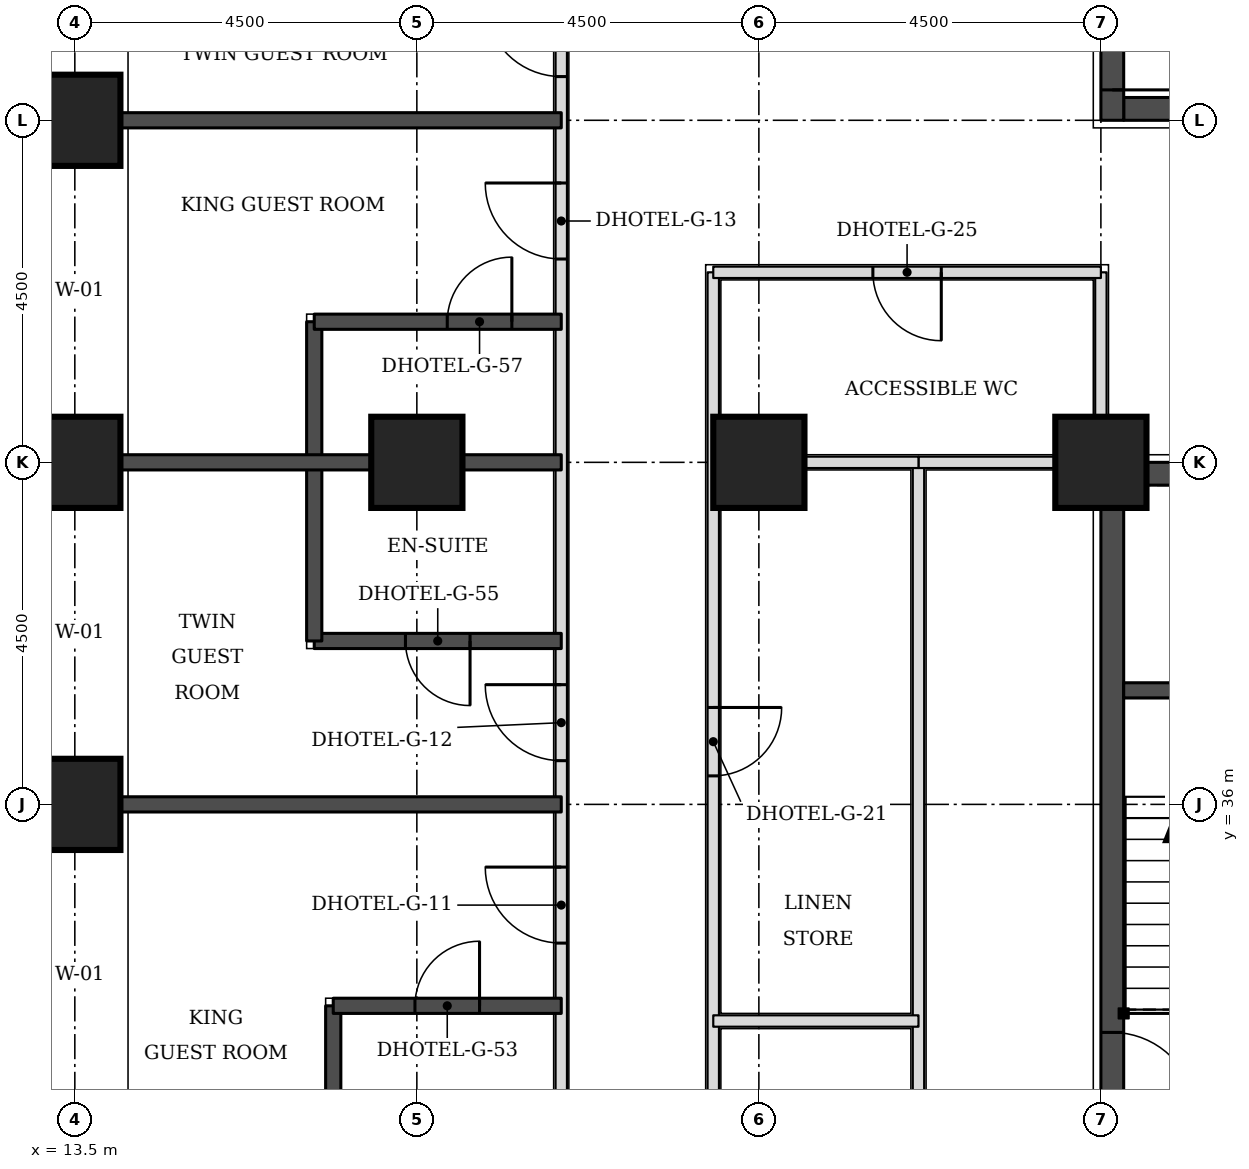
"""IFC4 building model, lengths in metres.
Left out: names, types, materials, properties, quantities, classifications, styles, units other than length and angle.
Written with IfcOpenShell. Run it as: python <this file> out.ifc"""

import sys

from ifc_helpers import new_model, si_unit, direction, frame, frame_2d, origin, origin_2d, place, context, subcontext, project, spatial, rectangle, extrude, element, fill, save


model = new_model("IFC4")
c1 = context("Model", 3, precision=1e-05, world=origin(), true_north=direction((0.0, 1.0)))
c2 = subcontext(c1, "Body", "Model", "MODEL_VIEW")
j1 = project(units=[si_unit("LENGTHUNIT", "METRE"), si_unit("PLANEANGLEUNIT", "RADIAN")], contexts=[c1])
p1 = place(None, origin())
s1 = spatial("IfcSite", under=j1, at=p1, CompositionType="ELEMENT")
p2 = place(p1, origin())
s2 = spatial("IfcBuilding", under=s1, at=p2, CompositionType="ELEMENT")
p3 = place(p2, frame((0.0, 0.0, 66.0)))
s3 = spatial("IfcBuildingStorey", under=s2, at=p3, CompositionType="ELEMENT", Elevation=66.0)
for number, where, z_axis, x_axis in (
    (1, (13.5, 36.0, 0.0), (0.0, 0.0, 1.0), (1.0, 0.0, 0.0)),
    (2, (13.5, 40.5, 0.0), (0.0, 0.0, 1.0), (1.0, 0.0, 0.0)),
    (3, (18.0, 40.5, 0.0), (0.0, 0.0, 1.0), (1.0, 0.0, 0.0)),
    (4, (22.5, 40.5, 0.0), (0.0, 0.0, 1.0), (1.0, 0.0, 0.0)),
    (5, (27.0, 40.5, 0.0), (0.0, 0.0, 1.0), (1.0, 0.0, 0.0)),
    (6, (13.5, 45.0, 0.0), (0.0, 0.0, 1.0), (1.0, 0.0, 0.0)),
):
    element("IfcColumn", number, at=place(p3, frame(where, z_axis=z_axis, x_axis=x_axis)), inside=s3, PredefinedType="COLUMN", context=c2, shape_type="SweptSolid", body=[
        extrude(rectangle(XDim=1.2, YDim=1.2, at=origin_2d()), origin(), (0.0, 0.0, 1.0), 3.3),
    ])
p4 = place(p3, frame((27.3, 45.15, 0.0), z_axis=(0.0, 0.0, 1.0), x_axis=(1.0, 0.0, 0.0)))
e7 = element("IfcWall", 7, at=p4, inside=s3, PredefinedType="SHEAR", context=c2, shape_type="SweptSolid", body=[
    extrude(rectangle(XDim=8.4, YDim=0.3, at=frame_2d((4.2, 0.0))), origin(), (0.0, 0.0, 1.0), 3.3),
])
p5 = place(p4, frame((5.2, 0.0, 0.0)))
e8 = element("IfcOpeningElement", 8, at=p5, cuts=e7, PredefinedType="OPENING", context=c2, shape_type="SweptSolid", body=[
    extrude(rectangle(XDim=1.0, YDim=2.1, at=frame_2d((0.5, 1.05))), frame((0.0, 0.16, 0.0), z_axis=(0.0, -1.0, 0.0), x_axis=(1.0, 0.0, 0.0)), (0.0, 0.0, 1.0), 0.32),
])
p6 = place(p3, frame((27.15, 45.0, 0.0), z_axis=(0.0, 0.0, 1.0), x_axis=(0.0, 1.0, 0.0)))
e9 = element("IfcWall", 9, at=p6, inside=s3, PredefinedType="SHEAR", context=c2, shape_type="SweptSolid", body=[
    extrude(rectangle(XDim=9.0, YDim=0.3, at=frame_2d((4.5, 0.0))), origin(), (0.0, 0.0, 1.0), 3.3),
])
p7 = place(p6, frame((0.4, 0.0, 0.0)))
e10 = element("IfcOpeningElement", 10, at=p7, cuts=e9, PredefinedType="OPENING", context=c2, shape_type="SweptSolid", body=[
    extrude(rectangle(XDim=1.1, YDim=2.1, at=frame_2d((0.55, 1.05))), frame((0.0, 0.16, 0.0), z_axis=(0.0, -1.0, 0.0), x_axis=(1.0, 0.0, 0.0)), (0.0, 0.0, 1.0), 0.32),
])
p8 = place(p3, frame((27.3, 40.35, 0.0), z_axis=(0.0, 0.0, 1.0), x_axis=(1.0, 0.0, 0.0)))
e11 = element("IfcWall", 11, at=p8, inside=s3, PredefinedType="SHEAR", context=c2, shape_type="SweptSolid", body=[
    extrude(rectangle(XDim=8.4, YDim=0.3, at=frame_2d((4.2, 0.0))), origin(), (0.0, 0.0, 1.0), 3.3),
])
p9 = place(p8, frame((6.4, 0.0, 0.0)))
e12 = element("IfcOpeningElement", 12, at=p9, cuts=e11, PredefinedType="OPENING", context=c2, shape_type="SweptSolid", body=[
    extrude(rectangle(XDim=1.1, YDim=2.1, at=frame_2d((0.55, 1.05))), frame((0.0, 0.16, 0.0), z_axis=(0.0, -1.0, 0.0), x_axis=(1.0, 0.0, 0.0)), (0.0, 0.0, 1.0), 0.32),
])
p10 = place(p3, frame((27.15, 31.5, 0.0), z_axis=(0.0, 0.0, 1.0), x_axis=(0.0, 1.0, 0.0)))
e13 = element("IfcWall", 13, at=p10, inside=s3, PredefinedType="SHEAR", context=c2, shape_type="SweptSolid", body=[
    extrude(rectangle(XDim=9.0, YDim=0.3, at=frame_2d((4.5, 0.0))), origin(), (0.0, 0.0, 1.0), 3.3),
])
p11 = place(p10, frame((0.4, 0.0, 0.0)))
e14 = element("IfcOpeningElement", 14, at=p11, cuts=e13, PredefinedType="OPENING", context=c2, shape_type="SweptSolid", body=[
    extrude(rectangle(XDim=1.1, YDim=2.1, at=frame_2d((0.55, 1.05))), frame((0.0, 0.16, 0.0), z_axis=(0.0, -1.0, 0.0), x_axis=(1.0, 0.0, 0.0)), (0.0, 0.0, 1.0), 0.32),
])
p12 = place(p3, frame((19.9, 24.4, 0.0), z_axis=(0.0, 0.0, 1.0), x_axis=(0.0, 1.0, 0.0)))
e15 = element("IfcWall", 15, at=p12, inside=s3, PredefinedType="PARTITIONING", context=c2, shape_type="SweptSolid", body=[
    extrude(rectangle(XDim=25.1, YDim=0.15, at=frame_2d((12.55, 0.0))), origin(), (0.0, 0.0, 1.0), 3.08),
])
p13 = place(p12, frame((0.775, 0.0, 0.0)))
e16 = element("IfcOpeningElement", 16, at=p13, cuts=e15, PredefinedType="OPENING", context=c2, shape_type="SweptSolid", body=[
    extrude(rectangle(XDim=1.0, YDim=2.1, at=frame_2d((0.5, 1.05))), frame((0.0, 0.085, 0.0), z_axis=(0.0, -1.0, 0.0), x_axis=(1.0, 0.0, 0.0)), (0.0, 0.0, 1.0), 0.17),
])
p14 = place(p12, frame((3.175, 0.0, 0.0)))
e17 = element("IfcOpeningElement", 17, at=p14, cuts=e15, PredefinedType="OPENING", context=c2, shape_type="SweptSolid", body=[
    extrude(rectangle(XDim=1.0, YDim=2.1, at=frame_2d((0.5, 1.05))), frame((0.0, 0.085, 0.0), z_axis=(0.0, -1.0, 0.0), x_axis=(1.0, 0.0, 0.0)), (0.0, 0.0, 1.0), 0.17),
])
p15 = place(p12, frame((9.775, 0.0, 0.0)))
e18 = element("IfcOpeningElement", 18, at=p15, cuts=e15, PredefinedType="OPENING", context=c2, shape_type="SweptSolid", body=[
    extrude(rectangle(XDim=1.0, YDim=2.1, at=frame_2d((0.5, 1.05))), frame((0.0, 0.085, 0.0), z_axis=(0.0, -1.0, 0.0), x_axis=(1.0, 0.0, 0.0)), (0.0, 0.0, 1.0), 0.17),
])
p16 = place(p12, frame((12.175, 0.0, 0.0)))
e19 = element("IfcOpeningElement", 19, at=p16, cuts=e15, PredefinedType="OPENING", context=c2, shape_type="SweptSolid", body=[
    extrude(rectangle(XDim=1.0, YDim=2.1, at=frame_2d((0.5, 1.05))), frame((0.0, 0.085, 0.0), z_axis=(0.0, -1.0, 0.0), x_axis=(1.0, 0.0, 0.0)), (0.0, 0.0, 1.0), 0.17),
])
p17 = place(p12, frame((18.775, 0.0, 0.0)))
e20 = element("IfcOpeningElement", 20, at=p17, cuts=e15, PredefinedType="OPENING", context=c2, shape_type="SweptSolid", body=[
    extrude(rectangle(XDim=1.0, YDim=2.1, at=frame_2d((0.5, 1.05))), frame((0.0, 0.085, 0.0), z_axis=(0.0, -1.0, 0.0), x_axis=(1.0, 0.0, 0.0)), (0.0, 0.0, 1.0), 0.17),
])
p18 = place(p12, frame((21.175, 0.0, 0.0)))
e21 = element("IfcOpeningElement", 21, at=p18, cuts=e15, PredefinedType="OPENING", context=c2, shape_type="SweptSolid", body=[
    extrude(rectangle(XDim=1.0, YDim=2.1, at=frame_2d((0.5, 1.05))), frame((0.0, 0.085, 0.0), z_axis=(0.0, -1.0, 0.0), x_axis=(1.0, 0.0, 0.0)), (0.0, 0.0, 1.0), 0.17),
])
p19 = place(p3, frame((21.9, 26.4, 0.0), z_axis=(0.0, 0.0, 1.0), x_axis=(0.0, 1.0, 0.0)))
e22 = element("IfcWall", 22, at=p19, inside=s3, PredefinedType="PARTITIONING", context=c2, shape_type="SweptSolid", body=[
    extrude(rectangle(XDim=16.6, YDim=0.15, at=frame_2d((8.3, 0.0))), origin(), (0.0, 0.0, 1.0), 3.08),
])
p20 = place(p19, frame((2.925, 0.0, 0.0)))
e23 = element("IfcOpeningElement", 23, at=p20, cuts=e22, PredefinedType="OPENING", context=c2, shape_type="SweptSolid", body=[
    extrude(rectangle(XDim=0.9, YDim=2.1, at=frame_2d((0.45, 1.05))), frame((0.0, 0.085, 0.0), z_axis=(0.0, -1.0, 0.0), x_axis=(1.0, 0.0, 0.0)), (0.0, 0.0, 1.0), 0.17),
])
p21 = place(p19, frame((9.975, 0.0, 0.0)))
e24 = element("IfcOpeningElement", 24, at=p21, cuts=e22, PredefinedType="OPENING", context=c2, shape_type="SweptSolid", body=[
    extrude(rectangle(XDim=0.9, YDim=2.1, at=frame_2d((0.45, 1.05))), frame((0.0, 0.085, 0.0), z_axis=(0.0, -1.0, 0.0), x_axis=(1.0, 0.0, 0.0)), (0.0, 0.0, 1.0), 0.17),
])
p22 = place(p3, frame((24.6, 26.4, 0.0), z_axis=(0.0, 0.0, 1.0), x_axis=(0.0, 1.0, 0.0)))
e25 = element("IfcWall", 25, at=p22, inside=s3, PredefinedType="PARTITIONING", context=c2, shape_type="SweptSolid", body=[
    extrude(rectangle(XDim=14.1, YDim=0.15, at=frame_2d((7.05, 0.0))), origin(), (0.0, 0.0, 1.0), 3.08),
])
p23 = place(p3, frame((24.6, 40.5, 0.0), z_axis=(0.0, 0.0, 1.0), x_axis=(1.0, 0.0, 0.0)))
e26 = element("IfcWall", 26, at=p23, inside=s3, PredefinedType="PARTITIONING", context=c2, shape_type="SweptSolid", body=[
    extrude(rectangle(XDim=2.35, YDim=0.15, at=frame_2d((1.175, 0.0))), origin(), (0.0, 0.0, 1.0), 2.33),
])
p24 = place(p3, frame((27.0, 40.55, 0.0), z_axis=(0.0, 0.0, 1.0), x_axis=(0.0, 1.0, 0.0)))
e27 = element("IfcWall", 27, at=p24, inside=s3, PredefinedType="PARTITIONING", context=c2, shape_type="SweptSolid", body=[
    extrude(rectangle(XDim=2.45, YDim=0.15, at=frame_2d((1.225, 0.0))), origin(), (0.0, 0.0, 1.0), 3.08),
])
p25 = place(p3, frame((21.9, 43.0, 0.0), z_axis=(0.0, 0.0, 1.0), x_axis=(1.0, 0.0, 0.0)))
e28 = element("IfcWall", 28, at=p25, inside=s3, PredefinedType="PARTITIONING", context=c2, shape_type="SweptSolid", body=[
    extrude(rectangle(XDim=5.1, YDim=0.15, at=frame_2d((2.55, 0.0))), origin(), (0.0, 0.0, 1.0), 3.08),
])
p26 = place(p25, frame((2.1, 0.0, 0.0)))
e29 = element("IfcOpeningElement", 29, at=p26, cuts=e28, PredefinedType="OPENING", context=c2, shape_type="SweptSolid", body=[
    extrude(rectangle(XDim=0.9, YDim=2.1, at=frame_2d((0.45, 1.05))), frame((0.0, 0.085, 0.0), z_axis=(0.0, -1.0, 0.0), x_axis=(1.0, 0.0, 0.0)), (0.0, 0.0, 1.0), 0.17),
])
p27 = place(p3, frame((16.9, 29.15, 0.0), z_axis=(0.0, 0.0, 1.0), x_axis=(0.0, 1.0, 0.0)))
e30 = element("IfcWall", 30, at=p27, inside=s3, PredefinedType="SOLIDWALL", context=c2, shape_type="SweptSolid", body=[
    extrude(rectangle(XDim=4.2, YDim=0.2, at=frame_2d((2.1, 0.0))), origin(), (0.0, 0.0, 1.0), 3.08),
])
p28 = place(p3, frame((16.9, 33.35, 0.0), z_axis=(0.0, 0.0, 1.0), x_axis=(1.0, 0.0, 0.0)))
e31 = element("IfcWall", 31, at=p28, inside=s3, PredefinedType="SOLIDWALL", context=c2, shape_type="SweptSolid", body=[
    extrude(rectangle(XDim=3.0, YDim=0.2, at=frame_2d((1.5, 0.0))), origin(), (0.0, 0.0, 1.0), 3.08),
])
p29 = place(p28, frame((1.075, 0.0, 0.0)))
e32 = element("IfcOpeningElement", 32, at=p29, cuts=e31, PredefinedType="OPENING", context=c2, shape_type="SweptSolid", body=[
    extrude(rectangle(XDim=0.85, YDim=2.1, at=frame_2d((0.425, 1.05))), frame((0.0, 0.11, 0.0), z_axis=(0.0, -1.0, 0.0), x_axis=(1.0, 0.0, 0.0)), (0.0, 0.0, 1.0), 0.22),
])
p30 = place(p3, frame((14.1, 36.0, 0.0), z_axis=(0.0, 0.0, 1.0), x_axis=(1.0, 0.0, 0.0)))
e33 = element("IfcWall", 33, at=p30, inside=s3, PredefinedType="SOLIDWALL", context=c2, shape_type="SweptSolid", body=[
    extrude(rectangle(XDim=5.8, YDim=0.2, at=frame_2d((2.9, 0.0))), origin(), (0.0, 0.0, 1.0), 3.08),
])
p31 = place(p3, frame((16.65, 38.15, 0.0), z_axis=(0.0, 0.0, 1.0), x_axis=(1.0, 0.0, 0.0)))
e34 = element("IfcWall", 34, at=p31, inside=s3, PredefinedType="SOLIDWALL", context=c2, shape_type="SweptSolid", body=[
    extrude(rectangle(XDim=3.25, YDim=0.2, at=frame_2d((1.625, 0.0))), origin(), (0.0, 0.0, 1.0), 3.08),
])
p32 = place(p31, frame((1.2, 0.0, 0.0)))
e35 = element("IfcOpeningElement", 35, at=p32, cuts=e34, PredefinedType="OPENING", context=c2, shape_type="SweptSolid", body=[
    extrude(rectangle(XDim=0.85, YDim=2.1, at=frame_2d((0.425, 1.05))), frame((0.0, 0.11, 0.0), z_axis=(0.0, -1.0, 0.0), x_axis=(1.0, 0.0, 0.0)), (0.0, 0.0, 1.0), 0.22),
])
p33 = place(p3, frame((16.65, 38.15, 0.0), z_axis=(0.0, 0.0, 1.0), x_axis=(0.0, 1.0, 0.0)))
e36 = element("IfcWall", 36, at=p33, inside=s3, PredefinedType="SOLIDWALL", context=c2, shape_type="SweptSolid", body=[
    extrude(rectangle(XDim=4.2, YDim=0.2, at=frame_2d((2.1, 0.0))), origin(), (0.0, 0.0, 1.0), 3.08),
])
p34 = place(p3, frame((14.1, 40.5, 0.0), z_axis=(0.0, 0.0, 1.0), x_axis=(1.0, 0.0, 0.0)))
e37 = element("IfcWall", 37, at=p34, inside=s3, PredefinedType="SOLIDWALL", context=c2, shape_type="SweptSolid", body=[
    extrude(rectangle(XDim=5.8, YDim=0.2, at=frame_2d((2.9, 0.0))), origin(), (0.0, 0.0, 1.0), 3.08),
])
p35 = place(p3, frame((16.65, 42.35, 0.0), z_axis=(0.0, 0.0, 1.0), x_axis=(1.0, 0.0, 0.0)))
e38 = element("IfcWall", 38, at=p35, inside=s3, PredefinedType="SOLIDWALL", context=c2, shape_type="SweptSolid", body=[
    extrude(rectangle(XDim=3.25, YDim=0.2, at=frame_2d((1.625, 0.0))), origin(), (0.0, 0.0, 1.0), 3.08),
])
p36 = place(p35, frame((1.75, 0.0, 0.0)))
e39 = element("IfcOpeningElement", 39, at=p36, cuts=e38, PredefinedType="OPENING", context=c2, shape_type="SweptSolid", body=[
    extrude(rectangle(XDim=0.85, YDim=2.1, at=frame_2d((0.425, 1.05))), frame((0.0, 0.11, 0.0), z_axis=(0.0, -1.0, 0.0), x_axis=(1.0, 0.0, 0.0)), (0.0, 0.0, 1.0), 0.22),
])
p37 = place(p3, frame((14.1, 45.0, 0.0), z_axis=(0.0, 0.0, 1.0), x_axis=(1.0, 0.0, 0.0)))
e40 = element("IfcWall", 40, at=p37, inside=s3, PredefinedType="SOLIDWALL", context=c2, shape_type="SweptSolid", body=[
    extrude(rectangle(XDim=5.8, YDim=0.2, at=frame_2d((2.9, 0.0))), origin(), (0.0, 0.0, 1.0), 3.08),
])
p38 = place(p3, frame((21.9, 33.15, 0.0), z_axis=(0.0, 0.0, 1.0), x_axis=(1.0, 0.0, 0.0)))
e41 = element("IfcWall", 41, at=p38, inside=s3, PredefinedType="PARTITIONING", context=c2, shape_type="SweptSolid", body=[
    extrude(rectangle(XDim=2.7, YDim=0.15, at=frame_2d((1.35, 0.0))), origin(), (0.0, 0.0, 1.0), 3.08),
])
p39 = place(p3, frame((21.9, 40.5, 0.0), z_axis=(0.0, 0.0, 1.0), x_axis=(1.0, 0.0, 0.0)))
e42 = element("IfcWall", 42, at=p39, inside=s3, PredefinedType="PARTITIONING", context=c2, shape_type="SweptSolid", body=[
    extrude(rectangle(XDim=2.7, YDim=0.15, at=frame_2d((1.35, 0.0))), origin(), (0.0, 0.0, 1.0), 2.33),
])
p40 = place(p3, frame((27.3, 37.5, 0.0), z_axis=(0.0, 0.0, 1.0), x_axis=(1.0, 0.0, 0.0)))
e43 = element("IfcWall", 43, at=p40, inside=s3, PredefinedType="SOLIDWALL", context=c2, shape_type="SweptSolid", body=[
    extrude(rectangle(XDim=5.4, YDim=0.2, at=frame_2d((2.7, 0.0))), origin(), (0.0, 0.0, 1.0), 3.08),
])
p41 = place(p15, origin())
e44 = element("IfcDoor", 44, at=p41, inside=s3, OperationType="SINGLE_SWING_RIGHT", PredefinedType="DOOR", context=c2, shape_type="SweptSolid", body=[
    extrude(rectangle(XDim=1.0, YDim=2.1, at=frame_2d((0.5, 1.05))), frame((0.0, 0.025, 0.0), z_axis=(0.0, -1.0, 0.0), x_axis=(1.0, 0.0, 0.0)), (0.0, 0.0, 1.0), 0.05),
])
fill(e18, e44)
p42 = place(p29, origin())
e45 = element("IfcDoor", 45, at=p42, inside=s3, OperationType="SINGLE_SWING_RIGHT", PredefinedType="DOOR", context=c2, shape_type="SweptSolid", body=[
    extrude(rectangle(XDim=0.85, YDim=2.1, at=frame_2d((0.425, 1.05))), frame((0.0, 0.025, 0.0), z_axis=(0.0, -1.0, 0.0), x_axis=(1.0, 0.0, 0.0)), (0.0, 0.0, 1.0), 0.05),
])
fill(e32, e45)
p43 = place(p16, origin())
e46 = element("IfcDoor", 46, at=p43, inside=s3, OperationType="SINGLE_SWING_RIGHT", PredefinedType="DOOR", context=c2, shape_type="SweptSolid", body=[
    extrude(rectangle(XDim=1.0, YDim=2.1, at=frame_2d((0.5, 1.05))), frame((0.0, 0.025, 0.0), z_axis=(0.0, -1.0, 0.0), x_axis=(1.0, 0.0, 0.0)), (0.0, 0.0, 1.0), 0.05),
])
fill(e19, e46)
p44 = place(p32, frame((0.85, 0.0, 0.0), z_axis=(0.0, 0.0, 1.0), x_axis=(-1.0, 0.0, 0.0)))
e47 = element("IfcDoor", 47, at=p44, inside=s3, OperationType="SINGLE_SWING_LEFT", PredefinedType="DOOR", context=c2, shape_type="SweptSolid", body=[
    extrude(rectangle(XDim=0.85, YDim=2.1, at=frame_2d((0.425, 1.05))), frame((0.0, 0.025, 0.0), z_axis=(0.0, -1.0, 0.0), x_axis=(1.0, 0.0, 0.0)), (0.0, 0.0, 1.0), 0.05),
])
fill(e35, e47)
p45 = place(p17, origin())
e48 = element("IfcDoor", 48, at=p45, inside=s3, OperationType="SINGLE_SWING_RIGHT", PredefinedType="DOOR", context=c2, shape_type="SweptSolid", body=[
    extrude(rectangle(XDim=1.0, YDim=2.1, at=frame_2d((0.5, 1.05))), frame((0.0, 0.025, 0.0), z_axis=(0.0, -1.0, 0.0), x_axis=(1.0, 0.0, 0.0)), (0.0, 0.0, 1.0), 0.05),
])
fill(e20, e48)
p46 = place(p36, origin())
e49 = element("IfcDoor", 49, at=p46, inside=s3, OperationType="SINGLE_SWING_RIGHT", PredefinedType="DOOR", context=c2, shape_type="SweptSolid", body=[
    extrude(rectangle(XDim=0.85, YDim=2.1, at=frame_2d((0.425, 1.05))), frame((0.0, 0.025, 0.0), z_axis=(0.0, -1.0, 0.0), x_axis=(1.0, 0.0, 0.0)), (0.0, 0.0, 1.0), 0.05),
])
fill(e39, e49)
p47 = place(p18, origin())
e50 = element("IfcDoor", 50, at=p47, inside=s3, OperationType="SINGLE_SWING_RIGHT", PredefinedType="DOOR", context=c2, shape_type="SweptSolid", body=[
    extrude(rectangle(XDim=1.0, YDim=2.1, at=frame_2d((0.5, 1.05))), frame((0.0, 0.025, 0.0), z_axis=(0.0, -1.0, 0.0), x_axis=(1.0, 0.0, 0.0)), (0.0, 0.0, 1.0), 0.05),
])
fill(e21, e50)
p48 = place(p21, frame((0.9, 0.0, 0.0), z_axis=(0.0, 0.0, 1.0), x_axis=(-1.0, 0.0, 0.0)))
e51 = element("IfcDoor", 51, at=p48, inside=s3, OperationType="SINGLE_SWING_LEFT", PredefinedType="DOOR", context=c2, shape_type="SweptSolid", body=[
    extrude(rectangle(XDim=0.9, YDim=2.1, at=frame_2d((0.45, 1.05))), frame((0.0, 0.025, 0.0), z_axis=(0.0, -1.0, 0.0), x_axis=(1.0, 0.0, 0.0)), (0.0, 0.0, 1.0), 0.05),
])
fill(e24, e51)
p49 = place(p26, frame((0.9, 0.0, 0.0), z_axis=(0.0, 0.0, 1.0), x_axis=(-1.0, 0.0, 0.0)))
e52 = element("IfcDoor", 52, at=p49, inside=s3, OperationType="SINGLE_SWING_LEFT", PredefinedType="DOOR", context=c2, shape_type="SweptSolid", body=[
    extrude(rectangle(XDim=0.9, YDim=2.1, at=frame_2d((0.45, 1.05))), frame((0.0, 0.025, 0.0), z_axis=(0.0, -1.0, 0.0), x_axis=(1.0, 0.0, 0.0)), (0.0, 0.0, 1.0), 0.05),
])
fill(e29, e52)
p50 = place(p7, frame((1.1, 0.0, 0.0), z_axis=(0.0, 0.0, 1.0), x_axis=(-1.0, 0.0, 0.0)))
e53 = element("IfcDoor", 53, at=p50, inside=s3, OperationType="SINGLE_SWING_RIGHT", PredefinedType="DOOR", context=c2, shape_type="SweptSolid", body=[
    extrude(rectangle(XDim=1.1, YDim=2.1, at=frame_2d((0.55, 1.05))), frame((0.0, 0.025, 0.0), z_axis=(0.0, -1.0, 0.0), x_axis=(1.0, 0.0, 0.0)), (0.0, 0.0, 1.0), 0.05),
])
fill(e10, e53)
p51 = place(p11, frame((1.1, 0.0, 0.0), z_axis=(0.0, 0.0, 1.0), x_axis=(-1.0, 0.0, 0.0)))
e54 = element("IfcDoor", 54, at=p51, inside=s3, OperationType="SINGLE_SWING_RIGHT", PredefinedType="DOOR", context=c2, shape_type="SweptSolid", body=[
    extrude(rectangle(XDim=1.1, YDim=2.1, at=frame_2d((0.55, 1.05))), frame((0.0, 0.025, 0.0), z_axis=(0.0, -1.0, 0.0), x_axis=(1.0, 0.0, 0.0)), (0.0, 0.0, 1.0), 0.05),
])
fill(e14, e54)
save(model, sys.argv[1])
